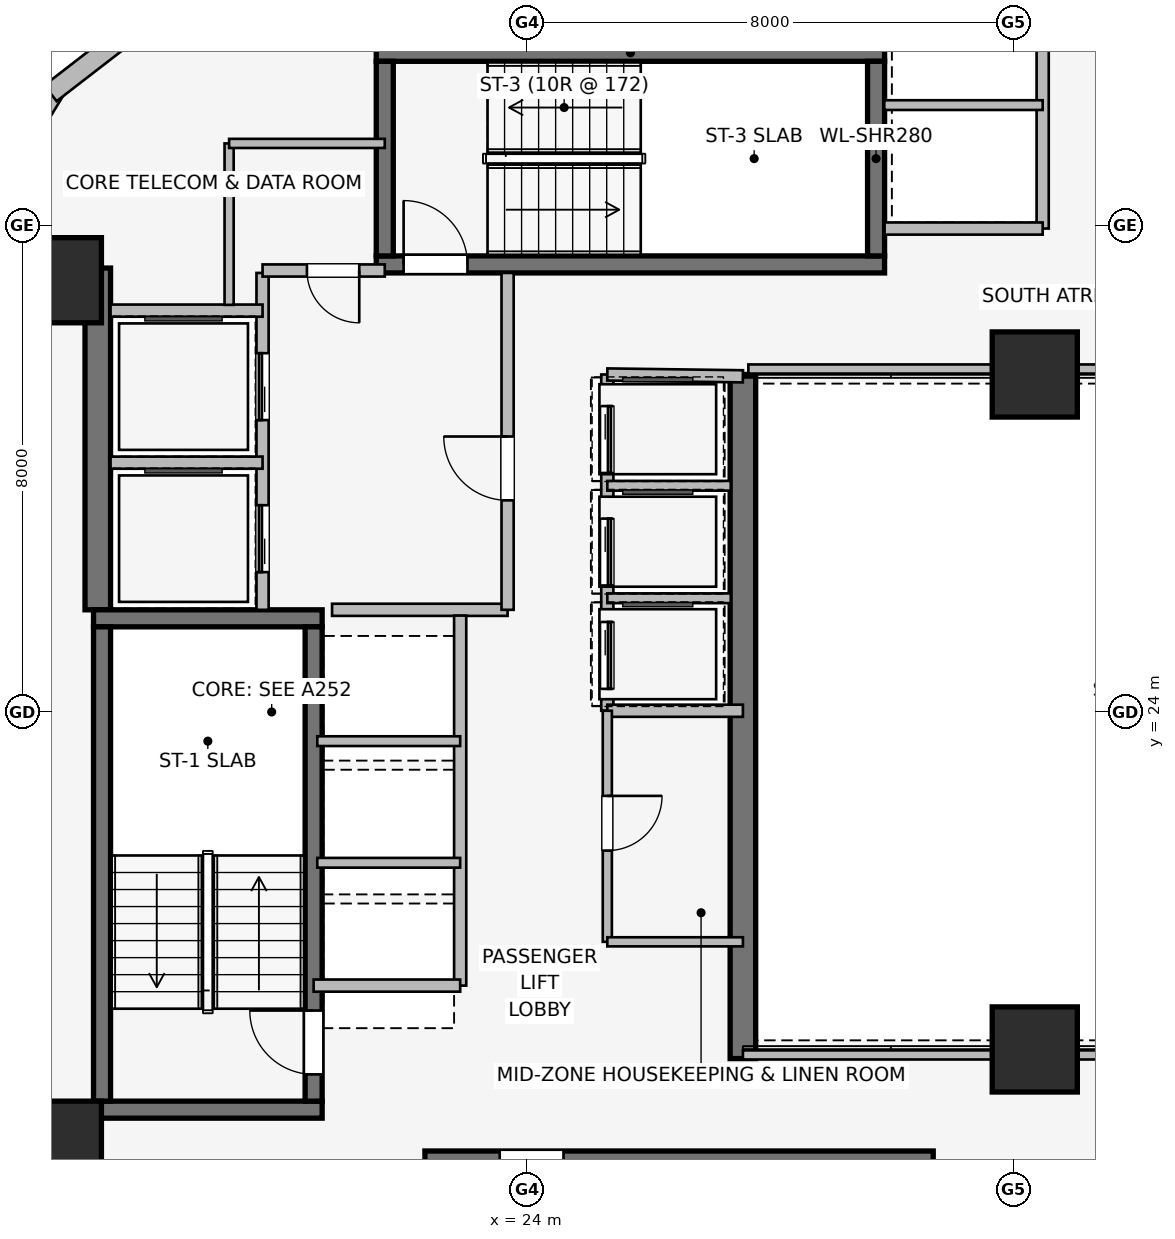
"""IFC4 building model, lengths in metres.
Left out: names, types, materials, properties, quantities, classifications, styles, units other than length and angle.
Written with IfcOpenShell. Run it as: python <this file> out.ifc"""

import sys

from ifc_helpers import new_model, si_unit, direction, frame, frame_2d, origin, origin_2d, place, context, subcontext, project, spatial, rectangle, extrude, element, fill, save


model = new_model("IFC4")
c1 = context("Model", 3, precision=1e-05, world=origin(), true_north=direction((0.0, 1.0)))
c2 = subcontext(c1, "Body", "Model", "MODEL_VIEW")
j1 = project(units=[si_unit("LENGTHUNIT", "METRE"), si_unit("PLANEANGLEUNIT", "RADIAN")], contexts=[c1])
p1 = place(None, origin())
s1 = spatial("IfcSite", under=j1, at=p1, CompositionType="ELEMENT")
p2 = place(p1, origin())
s2 = spatial("IfcBuilding", under=s1, at=p2, CompositionType="ELEMENT")
p3 = place(p2, frame((0.0, 0.0, 184.35)))
s3 = spatial("IfcBuildingStorey", under=s2, at=p3, CompositionType="ELEMENT", Elevation=184.35)
p4 = place(p3, frame((16.94, 25.68, 0.0), z_axis=(0.0, 0.0, 1.0), x_axis=(0.0, 1.0, 0.0)))
e1 = element("IfcWall", 1, at=p4, inside=s3, PredefinedType="SHEAR", context=c2, shape_type="SweptSolid", body=[
    extrude(rectangle(XDim=5.62, YDim=0.42, at=frame_2d((2.81, 0.0))), origin(), (0.0, 0.0, 1.0), 3.45),
])
p5 = place(p3, frame((27.55, 29.55, 0.0), z_axis=(0.0, 0.0, 1.0), x_axis=(0.0, -1.0, 0.0)))
e2 = element("IfcWall", 2, at=p5, inside=s3, PredefinedType="SHEAR", context=c2, shape_type="SweptSolid", body=[
    extrude(rectangle(XDim=11.25, YDim=0.42, at=frame_2d((5.625, 0.0))), origin(), (0.0, 0.0, 1.0), 3.45),
])
for number, where, z_axis, x_axis in (
    (3, (16.87, 17.46, 0.0), (0.0, 0.0, 1.0), (1.0, 0.0, 0.0)),
    (4, (20.63, 25.54, 0.0), (0.0, 0.0, 1.0), (-1.0, 0.0, 0.0)),
):
    element("IfcWall", number, at=place(p3, frame(where, z_axis=z_axis, x_axis=x_axis)), inside=s3, PredefinedType="SHEAR", context=c2, shape_type="SweptSolid", body=[
        extrude(rectangle(XDim=3.76, YDim=0.28, at=frame_2d((1.88, 0.0))), origin(), (0.0, 0.0, 1.0), 3.45),
    ])
p6 = place(p3, frame((17.01, 25.4, 0.0), z_axis=(0.0, 0.0, 1.0), x_axis=(0.0, -1.0, 0.0)))
e5 = element("IfcWall", 5, at=p6, inside=s3, PredefinedType="SHEAR", context=c2, shape_type="SweptSolid", body=[
    extrude(rectangle(XDim=7.8, YDim=0.28, at=frame_2d((3.9, 0.0))), origin(), (0.0, 0.0, 1.0), 3.45),
])
p7 = place(p3, frame((20.49, 17.6, 0.0), z_axis=(0.0, 0.0, 1.0), x_axis=(0.0, 1.0, 0.0)))
e6 = element("IfcWall", 6, at=p7, inside=s3, PredefinedType="SHEAR", context=c2, shape_type="SweptSolid", body=[
    extrude(rectangle(XDim=7.8, YDim=0.28, at=frame_2d((3.9, 0.0))), origin(), (0.0, 0.0, 1.0), 3.45),
])
p8 = place(p7, frame((0.44, 0.0, 0.0)))
e7 = element("IfcOpeningElement", 7, at=p8, cuts=e6, PredefinedType="OPENING", context=c2, shape_type="SweptSolid", body=[
    extrude(rectangle(XDim=1.05, YDim=2.0, at=frame_2d((0.525, 1.0))), frame((0.0, 0.15, 0.0), z_axis=(0.0, -1.0, 0.0), x_axis=(1.0, 0.0, 0.0)), (0.0, 0.0, 1.0), 0.3),
])
p9 = place(p3, frame((30.68, 16.64, 0.0), z_axis=(0.0, 0.0, 1.0), x_axis=(-1.0, 0.0, 0.0)))
e8 = element("IfcWall", 8, at=p9, inside=s3, PredefinedType="SHEAR", context=c2, shape_type="SweptSolid", body=[
    extrude(rectangle(XDim=8.36, YDim=0.28, at=frame_2d((4.18, 0.0))), origin(), (0.0, 0.0, 1.0), 3.45),
])
p10 = place(p9, frame((6.08, 0.0, 0.0)))
e9 = element("IfcOpeningElement", 9, at=p10, cuts=e8, PredefinedType="OPENING", context=c2, shape_type="SweptSolid", body=[
    extrude(rectangle(XDim=1.05, YDim=2.0, at=frame_2d((0.525, 1.0))), frame((0.0, 0.15, 0.0), z_axis=(0.0, -1.0, 0.0), x_axis=(1.0, 0.0, 0.0)), (0.0, 0.0, 1.0), 0.3),
])
p11 = place(p3, frame((21.52, 31.36, 0.0), z_axis=(0.0, 0.0, 1.0), x_axis=(1.0, 0.0, 0.0)))
e10 = element("IfcWall", 10, at=p11, inside=s3, PredefinedType="SHEAR", context=c2, shape_type="SweptSolid", body=[
    extrude(rectangle(XDim=8.36, YDim=0.28, at=frame_2d((4.18, 0.0))), origin(), (0.0, 0.0, 1.0), 3.45),
])
p12 = place(p11, frame((0.45, 0.0, 0.0)))
e11 = element("IfcOpeningElement", 11, at=p12, cuts=e10, PredefinedType="OPENING", context=c2, shape_type="SweptSolid", body=[
    extrude(rectangle(XDim=1.05, YDim=2.0, at=frame_2d((0.525, 1.0))), frame((0.0, 0.15, 0.0), z_axis=(0.0, -1.0, 0.0), x_axis=(1.0, 0.0, 0.0)), (0.0, 0.0, 1.0), 0.3),
])
p13 = place(p3, frame((29.88, 34.84, 0.0), z_axis=(0.0, 0.0, 1.0), x_axis=(-1.0, 0.0, 0.0)))
e12 = element("IfcWall", 12, at=p13, inside=s3, PredefinedType="SHEAR", context=c2, shape_type="SweptSolid", body=[
    extrude(rectangle(XDim=8.36, YDim=0.28, at=frame_2d((4.18, 0.0))), origin(), (0.0, 0.0, 1.0), 3.45),
])
for number, where, z_axis, x_axis in (
    (13, (21.66, 34.7, 0.0), (0.0, 0.0, 1.0), (0.0, -1.0, 0.0)),
    (14, (29.74, 31.5, 0.0), (0.0, 0.0, 1.0), (0.0, 1.0, 0.0)),
):
    element("IfcWall", number, at=place(p3, frame(where, z_axis=z_axis, x_axis=x_axis)), inside=s3, PredefinedType="SHEAR", context=c2, shape_type="SweptSolid", body=[
        extrude(rectangle(XDim=3.2, YDim=0.28, at=frame_2d((1.6, 0.0))), origin(), (0.0, 0.0, 1.0), 3.45),
    ])
for number, where, z_axis, x_axis in (
    (15, (16.3, 16.9, 0.0), (0.0, 0.0, 1.0), (1.0, 0.0, 0.0)),
    (16, (16.3, 31.1, 0.0), (0.0, 0.0, 1.0), (1.0, 0.0, 0.0)),
    (17, (32.35, 18.45, 0.0), (0.0, 0.0, 1.0), (1.0, 0.0, 0.0)),
    (18, (32.35, 29.55, 0.0), (0.0, 0.0, 1.0), (1.0, 0.0, 0.0)),
):
    element("IfcColumn", number, at=place(p3, frame(where, z_axis=z_axis, x_axis=x_axis)), inside=s3, PredefinedType="COLUMN", context=c2, shape_type="SweptSolid", body=[
        extrude(rectangle(XDim=1.4, YDim=1.4, at=origin_2d()), origin(), (0.0, 0.0, 1.0), 3.45),
    ])
p14 = place(p3, frame((15.415, 32.882, 0.0), z_axis=(0.0, 0.0, 1.0), x_axis=(0.520325409202, 0.853968072318, 0.0)))
e19 = element("IfcWall", 19, at=p14, inside=s3, PredefinedType="STANDARD", context=c2, shape_type="SweptSolid", body=[
    extrude(rectangle(XDim=1.678, YDim=0.33, at=frame_2d((0.839, 0.0))), origin(), (0.0, 0.0, 1.0), 3.19),
])
p15 = place(p3, frame((16.162, 34.175, 0.0), z_axis=(0.0, 0.0, 1.0), x_axis=(0.791409877269, 0.611285862884, 0.0)))
e20 = element("IfcWall", 20, at=p15, inside=s3, PredefinedType="STANDARD", context=c2, shape_type="SweptSolid", body=[
    extrude(rectangle(XDim=1.677, YDim=0.33, at=frame_2d((0.838, 0.0))), origin(), (0.0, 0.0, 1.0), 3.19),
])
p16 = place(p3, frame((19.65, 25.68, 0.0), z_axis=(0.0, 0.0, 1.0), x_axis=(0.0, 1.0, 0.0)))
e21 = element("IfcWall", 21, at=p16, inside=s3, PredefinedType="PARTITIONING", context=c2, shape_type="SweptSolid", body=[
    extrude(rectangle(XDim=5.54, YDim=0.2, at=frame_2d((2.77, 0.0))), origin(), (0.0, 0.0, 1.0), 3.19),
])
p17 = place(p16, frame((0.62, 0.0, 0.0)))
e22 = element("IfcOpeningElement", 22, at=p17, cuts=e21, PredefinedType="OPENING", context=c2, shape_type="SweptSolid", body=[
    extrude(rectangle(XDim=1.1, YDim=2.2, at=frame_2d((0.55, 1.1))), frame((0.0, 0.11, 0.0), z_axis=(0.0, -1.0, 0.0), x_axis=(1.0, 0.0, 0.0)), (0.0, 0.0, 1.0), 0.22),
])
p18 = place(p16, frame((3.12, 0.0, 0.0)))
e23 = element("IfcOpeningElement", 23, at=p18, cuts=e21, PredefinedType="OPENING", context=c2, shape_type="SweptSolid", body=[
    extrude(rectangle(XDim=1.1, YDim=2.2, at=frame_2d((0.55, 1.1))), frame((0.0, 0.11, 0.0), z_axis=(0.0, -1.0, 0.0), x_axis=(1.0, 0.0, 0.0)), (0.0, 0.0, 1.0), 0.22),
])
p19 = place(p3, frame((20.793, 25.68, 0.0), z_axis=(0.0, 0.0, 1.0), x_axis=(1.0, 0.0, 0.0)))
e24 = element("IfcWall", 24, at=p19, inside=s3, PredefinedType="PARTITIONING", context=c2, shape_type="SweptSolid", body=[
    extrude(rectangle(XDim=2.887, YDim=0.2, at=frame_2d((1.443, 0.0))), origin(), (0.0, 0.0, 1.0), 3.19),
])
p20 = place(p3, frame((23.68, 25.68, 0.0), z_axis=(0.0, 0.0, 1.0), x_axis=(0.0, 1.0, 0.0)))
e25 = element("IfcWall", 25, at=p20, inside=s3, PredefinedType="PARTITIONING", context=c2, shape_type="SweptSolid", body=[
    extrude(rectangle(XDim=5.54, YDim=0.2, at=frame_2d((2.77, 0.0))), origin(), (0.0, 0.0, 1.0), 3.19),
])
p21 = place(p20, frame((1.8, 0.0, 0.0)))
e26 = element("IfcOpeningElement", 26, at=p21, cuts=e25, PredefinedType="OPENING", context=c2, shape_type="SweptSolid", body=[
    extrude(rectangle(XDim=1.05, YDim=2.0, at=frame_2d((0.525, 1.0))), frame((0.0, 0.11, 0.0), z_axis=(0.0, -1.0, 0.0), x_axis=(1.0, 0.0, 0.0)), (0.0, 0.0, 1.0), 0.22),
])
p22 = place(p3, frame((21.66, 31.26, 0.0), z_axis=(0.0, 0.0, 1.0), x_axis=(-1.0, 0.0, 0.0)))
e27 = element("IfcWall", 27, at=p22, inside=s3, PredefinedType="PARTITIONING", context=c2, shape_type="SweptSolid", body=[
    extrude(rectangle(XDim=2.01, YDim=0.2, at=frame_2d((1.005, 0.0))), origin(), (0.0, 0.0, 1.0), 3.19),
])
p23 = place(p22, frame((0.42, 0.0, 0.0)))
e28 = element("IfcOpeningElement", 28, at=p23, cuts=e27, PredefinedType="OPENING", context=c2, shape_type="SweptSolid", body=[
    extrude(rectangle(XDim=0.86, YDim=2.0, at=frame_2d((0.43, 1.0))), frame((0.0, 0.11, 0.0), z_axis=(0.0, -1.0, 0.0), x_axis=(1.0, 0.0, 0.0)), (0.0, 0.0, 1.0), 0.22),
])
p24 = place(p3, frame((17.15, 28.1, 0.0), z_axis=(0.0, 0.0, 1.0), x_axis=(1.0, 0.0, 0.0)))
e29 = element("IfcWall", 29, at=p24, inside=s3, PredefinedType="PARTITIONING", context=c2, shape_type="SweptSolid", body=[
    extrude(rectangle(XDim=2.5, YDim=0.2, at=frame_2d((1.25, 0.0))), origin(), (0.0, 0.0, 1.0), 3.19),
])
p25 = place(p3, frame((19.65, 30.6, 0.0), z_axis=(0.0, 0.0, 1.0), x_axis=(-1.0, 0.0, 0.0)))
e30 = element("IfcWall", 30, at=p25, inside=s3, PredefinedType="PARTITIONING", context=c2, shape_type="SweptSolid", body=[
    extrude(rectangle(XDim=2.5, YDim=0.2, at=frame_2d((1.25, 0.0))), origin(), (0.0, 0.0, 1.0), 2.09),
])
p26 = place(p3, frame((32.48, 31.95, 0.0), z_axis=(0.0, 0.0, 1.0), x_axis=(0.0, 1.0, 0.0)))
e31 = element("IfcWall", 31, at=p26, inside=s3, PredefinedType="PARTITIONING", context=c2, shape_type="SweptSolid", body=[
    extrude(rectangle(XDim=4.05, YDim=0.2, at=frame_2d((2.025, 0.0))), origin(), (0.0, 0.0, 1.0), 3.19),
])
p27 = place(p3, frame((32.48, 31.95, 0.0), z_axis=(0.0, 0.0, 1.0), x_axis=(-1.0, 0.0, 0.0)))
e32 = element("IfcWall", 32, at=p27, inside=s3, PredefinedType="PARTITIONING", context=c2, shape_type="SweptSolid", body=[
    extrude(rectangle(XDim=2.6, YDim=0.2, at=frame_2d((1.3, 0.0))), origin(), (0.0, 0.0, 1.0), 3.19),
])
p28 = place(p3, frame((29.875, 33.98, 0.0), z_axis=(0.0, 0.0, 1.0), x_axis=(1.0, 0.0, 0.0)))
e33 = element("IfcWall", 33, at=p28, inside=s3, PredefinedType="PARTITIONING", context=c2, shape_type="SweptSolid", body=[
    extrude(rectangle(XDim=2.605, YDim=0.16, at=frame_2d((1.302, 0.0))), origin(), (0.0, 0.0, 1.0), 2.582),
])
p29 = place(p3, frame((22.9, 19.5, 0.0), z_axis=(0.0, 0.0, 1.0), x_axis=(0.0, 1.0, 0.0)))
e34 = element("IfcWall", 34, at=p29, inside=s3, PredefinedType="PARTITIONING", context=c2, shape_type="SweptSolid", body=[
    extrude(rectangle(XDim=6.085, YDim=0.2, at=frame_2d((3.042, 0.0))), origin(), (0.0, 0.0, 1.0), 3.19),
])
p30 = place(p3, frame((20.49, 19.5, 0.0), z_axis=(0.0, 0.0, 1.0), x_axis=(1.0, 0.0, 0.0)))
e35 = element("IfcWall", 35, at=p30, inside=s3, PredefinedType="PARTITIONING", context=c2, shape_type="SweptSolid", body=[
    extrude(rectangle(XDim=2.41, YDim=0.2, at=frame_2d((1.205, 0.0))), origin(), (0.0, 0.0, 1.0), 2.09),
])
for number, where, z_axis, x_axis in (
    (36, (20.55, 21.52, 0.0), (0.0, 0.0, 1.0), (1.0, 0.0, 0.0)),
    (37, (20.55, 23.52, 0.0), (0.0, 0.0, 1.0), (1.0, 0.0, 0.0)),
):
    element("IfcWall", number, at=place(p3, frame(where, z_axis=z_axis, x_axis=x_axis)), inside=s3, PredefinedType="PARTITIONING", context=c2, shape_type="SweptSolid", body=[
        extrude(rectangle(XDim=2.35, YDim=0.16, at=frame_2d((1.175, 0.0))), origin(), (0.0, 0.0, 1.0), 3.19),
    ])
p31 = place(p3, frame((25.32, 29.55, 0.0), z_axis=(0.0, 0.0, 1.0), x_axis=(0.0, -1.0, 0.0)))
e38 = element("IfcWall", 38, at=p31, inside=s3, PredefinedType="PARTITIONING", context=c2, shape_type="SweptSolid", body=[
    extrude(rectangle(XDim=5.53, YDim=0.2, at=frame_2d((2.765, 0.0))), origin(), (0.0, 0.0, 1.0), 3.19),
])
p32 = place(p31, frame((0.52, 0.0, 0.0)))
e39 = element("IfcOpeningElement", 39, at=p32, cuts=e38, PredefinedType="OPENING", context=c2, shape_type="SweptSolid", body=[
    extrude(rectangle(XDim=1.1, YDim=2.2, at=frame_2d((0.55, 1.1))), frame((0.0, 0.11, 0.0), z_axis=(0.0, -1.0, 0.0), x_axis=(1.0, 0.0, 0.0)), (0.0, 0.0, 1.0), 0.22),
])
p33 = place(p31, frame((2.37, 0.0, 0.0)))
e40 = element("IfcOpeningElement", 40, at=p33, cuts=e38, PredefinedType="OPENING", context=c2, shape_type="SweptSolid", body=[
    extrude(rectangle(XDim=1.1, YDim=2.2, at=frame_2d((0.55, 1.1))), frame((0.0, 0.11, 0.0), z_axis=(0.0, -1.0, 0.0), x_axis=(1.0, 0.0, 0.0)), (0.0, 0.0, 1.0), 0.22),
])
p34 = place(p31, frame((4.07, 0.0, 0.0)))
e41 = element("IfcOpeningElement", 41, at=p34, cuts=e38, PredefinedType="OPENING", context=c2, shape_type="SweptSolid", body=[
    extrude(rectangle(XDim=1.1, YDim=2.2, at=frame_2d((0.55, 1.1))), frame((0.0, 0.11, 0.0), z_axis=(0.0, -1.0, 0.0), x_axis=(1.0, 0.0, 0.0)), (0.0, 0.0, 1.0), 0.22),
])
p35 = place(p3, frame((27.55, 29.52, 0.0), z_axis=(0.0, 0.0, 1.0), x_axis=(-0.999909343457, 0.013464949556, 0.0)))
e42 = element("IfcWall", 42, at=p35, inside=s3, PredefinedType="PARTITIONING", context=c2, shape_type="SweptSolid", body=[
    extrude(rectangle(XDim=2.23, YDim=0.2, at=frame_2d((1.115, 0.0))), origin(), (0.0, 0.0, 1.0), 2.09),
])
p36 = place(p3, frame((25.32, 24.02, 0.0), z_axis=(0.0, 0.0, 1.0), x_axis=(1.0, 0.0, 0.0)))
e43 = element("IfcWall", 43, at=p36, inside=s3, PredefinedType="PARTITIONING", context=c2, shape_type="SweptSolid", body=[
    extrude(rectangle(XDim=2.23, YDim=0.2, at=frame_2d((1.115, 0.0))), origin(), (0.0, 0.0, 1.0), 3.19),
])
for number, where, z_axis, x_axis in (
    (44, (25.32, 25.87, 0.0), (0.0, 0.0, 1.0), (1.0, 0.0, 0.0)),
    (45, (25.32, 27.72, 0.0), (0.0, 0.0, 1.0), (1.0, 0.0, 0.0)),
):
    element("IfcWall", number, at=place(p3, frame(where, z_axis=z_axis, x_axis=x_axis)), inside=s3, PredefinedType="PARTITIONING", context=c2, shape_type="SweptSolid", body=[
        extrude(rectangle(XDim=2.03, YDim=0.16, at=frame_2d((1.015, 0.0))), origin(), (0.0, 0.0, 1.0), 3.19),
    ])
p37 = place(p3, frame((25.32, 24.02, 0.0), z_axis=(0.0, 0.0, 1.0), x_axis=(0.0, -1.0, 0.0)))
e46 = element("IfcWall", 46, at=p37, inside=s3, PredefinedType="PARTITIONING", context=c2, shape_type="SweptSolid", body=[
    extrude(rectangle(XDim=3.8, YDim=0.15, at=frame_2d((1.9, 0.0))), origin(), (0.0, 0.0, 1.0), 3.19),
])
p38 = place(p37, frame((1.4, 0.0, 0.0)))
e47 = element("IfcOpeningElement", 47, at=p38, cuts=e46, PredefinedType="OPENING", context=c2, shape_type="SweptSolid", body=[
    extrude(rectangle(XDim=0.9, YDim=2.0, at=frame_2d((0.45, 1.0))), frame((0.0, 0.085, 0.0), z_axis=(0.0, -1.0, 0.0), x_axis=(1.0, 0.0, 0.0)), (0.0, 0.0, 1.0), 0.17),
])
p39 = place(p3, frame((25.32, 20.22, 0.0), z_axis=(0.0, 0.0, 1.0), x_axis=(1.0, 0.0, 0.0)))
e48 = element("IfcWall", 48, at=p39, inside=s3, PredefinedType="PARTITIONING", context=c2, shape_type="SweptSolid", body=[
    extrude(rectangle(XDim=2.23, YDim=0.15, at=frame_2d((1.115, 0.0))), origin(), (0.0, 0.0, 1.0), 3.19),
])
p40 = place(p3, frame((19.1, 33.35, 0.0), z_axis=(0.0, 0.0, 1.0), x_axis=(0.0, -1.0, 0.0)))
e49 = element("IfcWall", 49, at=p40, inside=s3, PredefinedType="PARTITIONING", context=c2, shape_type="SweptSolid", body=[
    extrude(rectangle(XDim=2.655, YDim=0.15, at=frame_2d((1.328, 0.0))), origin(), (0.0, 0.0, 1.0), 3.19),
])
p41 = place(p3, frame((21.66, 33.35, 0.0), z_axis=(0.0, 0.0, 1.0), x_axis=(-1.0, 0.0, 0.0)))
e50 = element("IfcWall", 50, at=p41, inside=s3, PredefinedType="PARTITIONING", context=c2, shape_type="SweptSolid", body=[
    extrude(rectangle(XDim=2.56, YDim=0.15, at=frame_2d((1.28, 0.0))), origin(), (0.0, 0.0, 1.0), 3.19),
])
p42 = place(p3, frame((27.55, 18.36, 0.0), z_axis=(0.0, 0.0, 1.0), x_axis=(1.0, 0.0, 0.0)))
e51 = element("IfcWall", 51, at=p42, inside=s3, PredefinedType="PARTITIONING", context=c2, shape_type="SweptSolid", body=[
    extrude(rectangle(XDim=12.29, YDim=0.15, at=frame_2d((6.145, 0.0))), origin(), (0.0, 0.0, 1.0), 2.331),
])
p43 = place(p3, frame((39.84, 29.64, 0.0), z_axis=(0.0, 0.0, 1.0), x_axis=(-1.0, 0.0, 0.0)))
e52 = element("IfcWall", 52, at=p43, inside=s3, PredefinedType="PARTITIONING", context=c2, shape_type="SweptSolid", body=[
    extrude(rectangle(XDim=12.2, YDim=0.15, at=frame_2d((6.1, 0.0))), origin(), (0.0, 0.0, 1.0), 2.331),
])
p44 = place(p8, origin())
e53 = element("IfcDoor", 53, at=p44, inside=s3, OperationType="SINGLE_SWING_RIGHT", PredefinedType="DOOR", context=c2, shape_type="SweptSolid", body=[
    extrude(rectangle(XDim=1.05, YDim=2.0, at=frame_2d((0.525, 1.0))), frame((0.0, 0.025, 0.0), z_axis=(0.0, -1.0, 0.0), x_axis=(1.0, 0.0, 0.0)), (0.0, 0.0, 1.0), 0.05),
])
fill(e7, e53)
p45 = place(p10, origin())
e54 = element("IfcDoor", 54, at=p45, inside=s3, OperationType="SINGLE_SWING_RIGHT", PredefinedType="DOOR", context=c2, shape_type="SweptSolid", body=[
    extrude(rectangle(XDim=1.05, YDim=2.0, at=frame_2d((0.525, 1.0))), frame((0.0, 0.025, 0.0), z_axis=(0.0, -1.0, 0.0), x_axis=(1.0, 0.0, 0.0)), (0.0, 0.0, 1.0), 0.05),
])
fill(e9, e54)
p46 = place(p12, origin())
e55 = element("IfcDoor", 55, at=p46, inside=s3, OperationType="SINGLE_SWING_LEFT", PredefinedType="DOOR", context=c2, shape_type="SweptSolid", body=[
    extrude(rectangle(XDim=1.05, YDim=2.0, at=frame_2d((0.525, 1.0))), frame((0.0, 0.025, 0.0), z_axis=(0.0, -1.0, 0.0), x_axis=(1.0, 0.0, 0.0)), (0.0, 0.0, 1.0), 0.05),
])
fill(e11, e55)
p47 = place(p17, origin())
e56 = element("IfcDoor", 56, at=p47, inside=s3, OperationType="SLIDING_TO_LEFT", PredefinedType="DOOR", context=c2, shape_type="SweptSolid", body=[
    extrude(rectangle(XDim=1.1, YDim=2.2, at=frame_2d((0.55, 1.1))), frame((0.0, 0.025, 0.0), z_axis=(0.0, -1.0, 0.0), x_axis=(1.0, 0.0, 0.0)), (0.0, 0.0, 1.0), 0.05),
])
fill(e22, e56)
p48 = place(p18, origin())
e57 = element("IfcDoor", 57, at=p48, inside=s3, OperationType="SLIDING_TO_LEFT", PredefinedType="DOOR", context=c2, shape_type="SweptSolid", body=[
    extrude(rectangle(XDim=1.1, YDim=2.2, at=frame_2d((0.55, 1.1))), frame((0.0, 0.025, 0.0), z_axis=(0.0, -1.0, 0.0), x_axis=(1.0, 0.0, 0.0)), (0.0, 0.0, 1.0), 0.05),
])
fill(e23, e57)
p49 = place(p21, origin())
e58 = element("IfcDoor", 58, at=p49, inside=s3, OperationType="SINGLE_SWING_RIGHT", PredefinedType="DOOR", context=c2, shape_type="SweptSolid", body=[
    extrude(rectangle(XDim=1.05, YDim=2.0, at=frame_2d((0.525, 1.0))), frame((0.0, 0.025, 0.0), z_axis=(0.0, -1.0, 0.0), x_axis=(1.0, 0.0, 0.0)), (0.0, 0.0, 1.0), 0.05),
])
fill(e26, e58)
p50 = place(p23, origin())
e59 = element("IfcDoor", 59, at=p50, inside=s3, OperationType="SINGLE_SWING_LEFT", PredefinedType="DOOR", context=c2, shape_type="SweptSolid", body=[
    extrude(rectangle(XDim=0.86, YDim=2.0, at=frame_2d((0.43, 1.0))), frame((0.0, 0.025, 0.0), z_axis=(0.0, -1.0, 0.0), x_axis=(1.0, 0.0, 0.0)), (0.0, 0.0, 1.0), 0.05),
])
fill(e28, e59)
p51 = place(p32, origin())
e60 = element("IfcDoor", 60, at=p51, inside=s3, OperationType="SLIDING_TO_LEFT", PredefinedType="DOOR", context=c2, shape_type="SweptSolid", body=[
    extrude(rectangle(XDim=1.1, YDim=2.2, at=frame_2d((0.55, 1.1))), frame((0.0, 0.025, 0.0), z_axis=(0.0, -1.0, 0.0), x_axis=(1.0, 0.0, 0.0)), (0.0, 0.0, 1.0), 0.05),
])
fill(e39, e60)
p52 = place(p33, origin())
e61 = element("IfcDoor", 61, at=p52, inside=s3, OperationType="SLIDING_TO_LEFT", PredefinedType="DOOR", context=c2, shape_type="SweptSolid", body=[
    extrude(rectangle(XDim=1.1, YDim=2.2, at=frame_2d((0.55, 1.1))), frame((0.0, 0.025, 0.0), z_axis=(0.0, -1.0, 0.0), x_axis=(1.0, 0.0, 0.0)), (0.0, 0.0, 1.0), 0.05),
])
fill(e40, e61)
p53 = place(p34, origin())
e62 = element("IfcDoor", 62, at=p53, inside=s3, OperationType="SLIDING_TO_LEFT", PredefinedType="DOOR", context=c2, shape_type="SweptSolid", body=[
    extrude(rectangle(XDim=1.1, YDim=2.2, at=frame_2d((0.55, 1.1))), frame((0.0, 0.025, 0.0), z_axis=(0.0, -1.0, 0.0), x_axis=(1.0, 0.0, 0.0)), (0.0, 0.0, 1.0), 0.05),
])
fill(e41, e62)
p54 = place(p38, origin())
e63 = element("IfcDoor", 63, at=p54, inside=s3, OperationType="SINGLE_SWING_LEFT", PredefinedType="DOOR", context=c2, shape_type="SweptSolid", body=[
    extrude(rectangle(XDim=0.9, YDim=2.0, at=frame_2d((0.45, 1.0))), frame((0.0, 0.025, 0.0), z_axis=(0.0, -1.0, 0.0), x_axis=(1.0, 0.0, 0.0)), (0.0, 0.0, 1.0), 0.05),
])
fill(e47, e63)
save(model, sys.argv[1])
